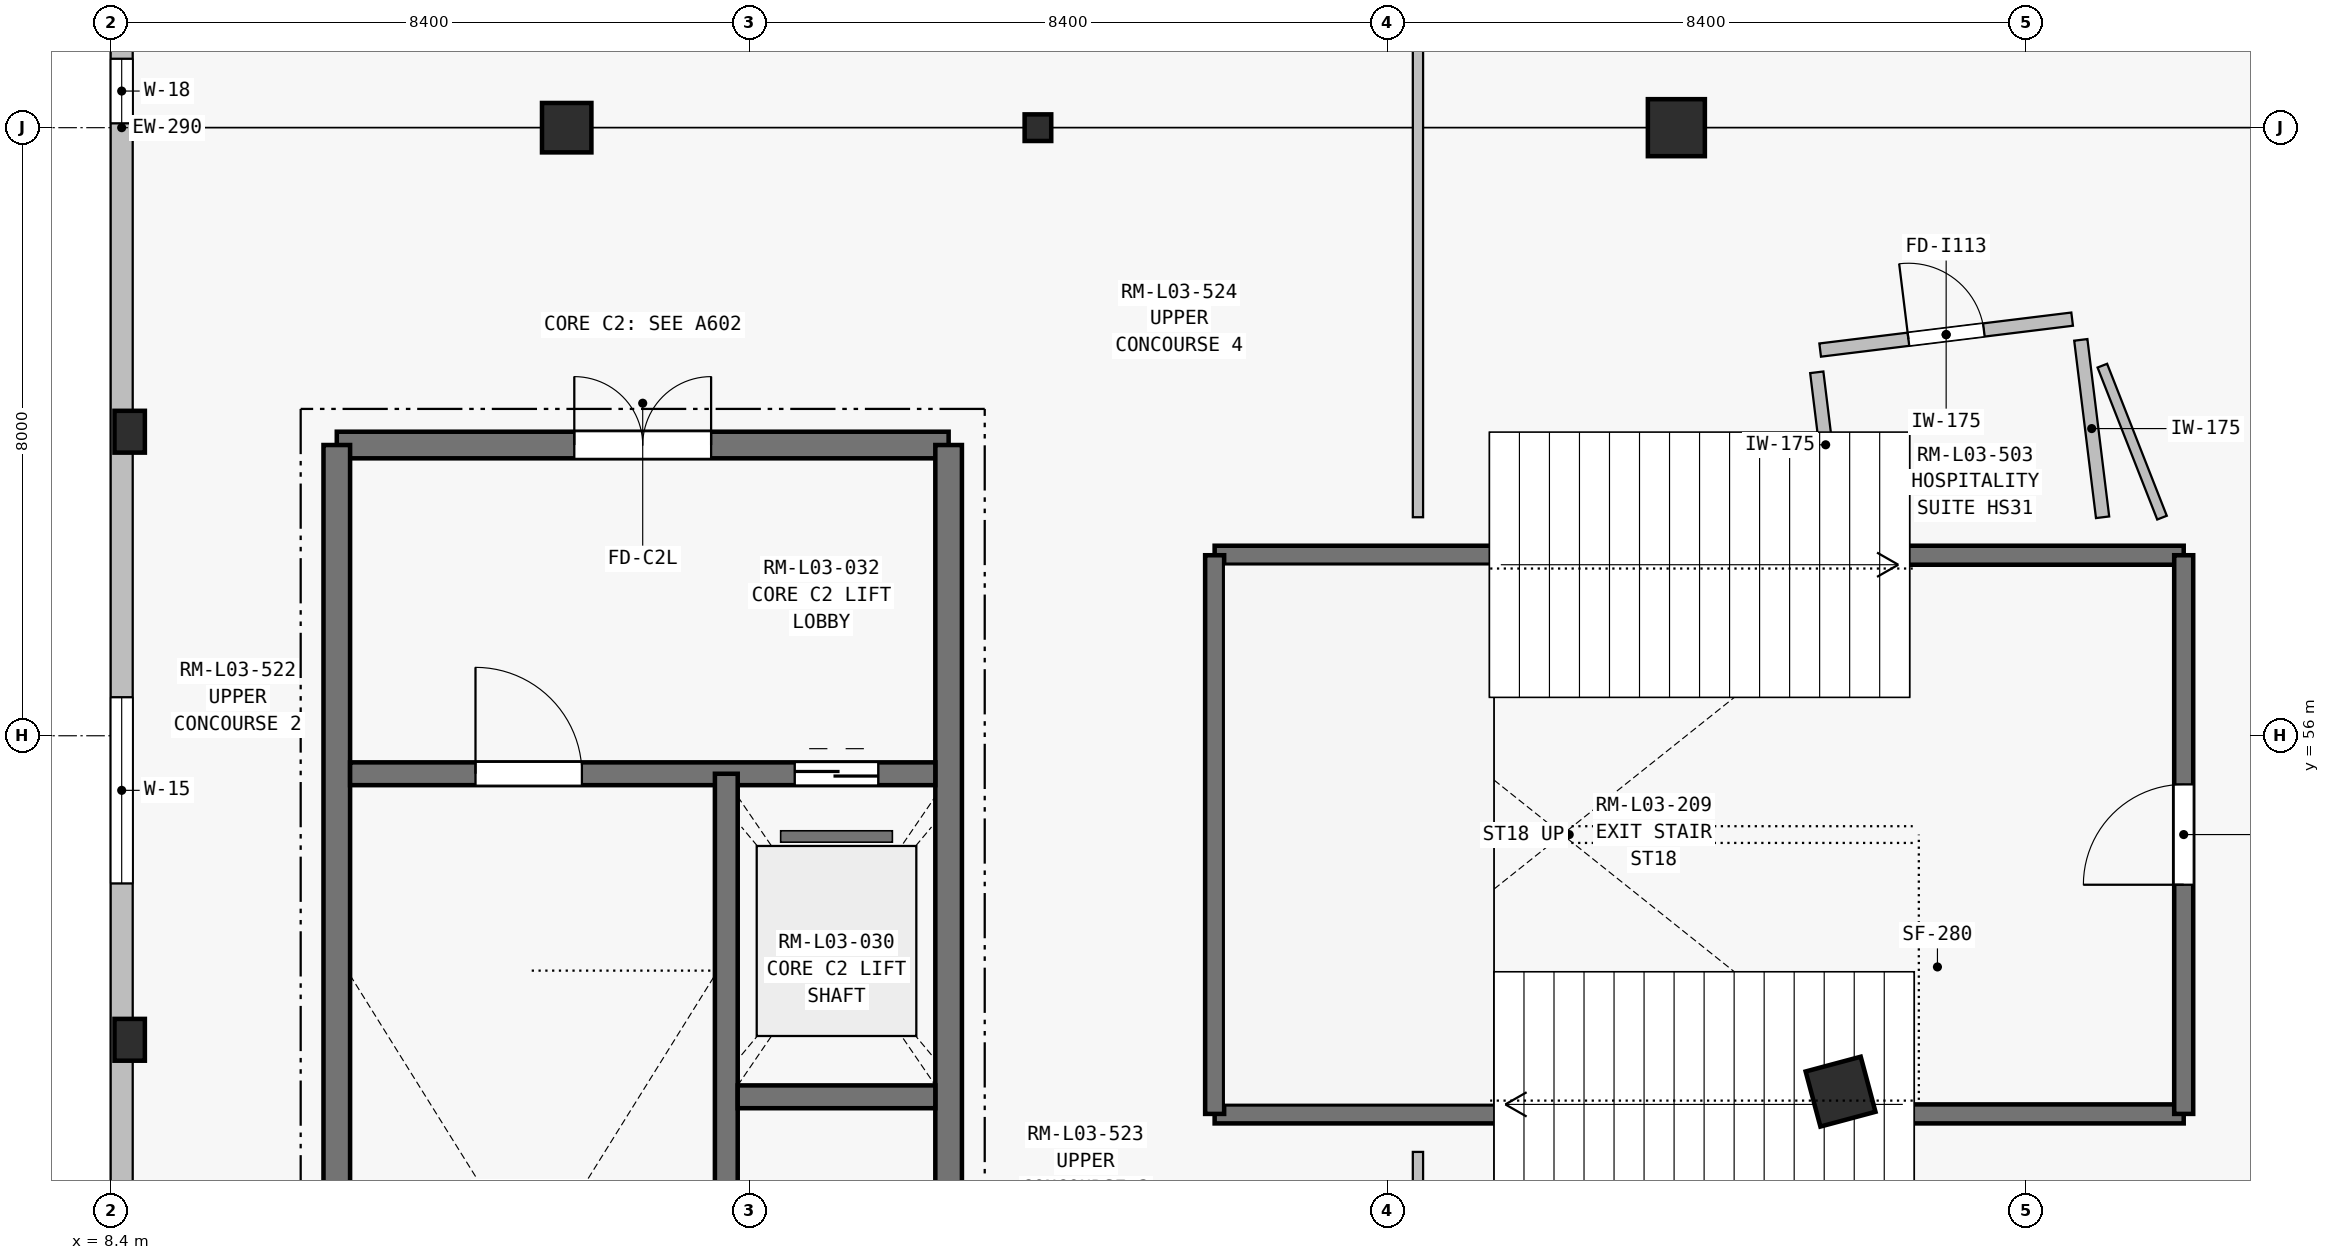
"""IFC4 building model, lengths in metres.
Left out: names, types, materials, properties, quantities, classifications, styles, units other than length and angle.
Written with IfcOpenShell. Run it as: python <this file> out.ifc"""

import sys

from ifc_helpers import new_model, si_unit, direction, frame, frame_2d, origin, origin_2d, place, context, subcontext, project, spatial, rectangle, i_section, extrude, element, fill, save


model = new_model("IFC4")
c1 = context("Model", 3, precision=1e-05, world=origin(), true_north=direction((0.0, 1.0)))
c2 = subcontext(c1, "Body", "Model", "MODEL_VIEW")
j1 = project(units=[si_unit("LENGTHUNIT", "METRE"), si_unit("PLANEANGLEUNIT", "RADIAN")], contexts=[c1])
p1 = place(None, origin())
s1 = spatial("IfcSite", under=j1, at=p1, CompositionType="ELEMENT")
p2 = place(p1, origin())
s2 = spatial("IfcBuilding", under=s1, at=p2, CompositionType="ELEMENT")
p3 = place(p2, frame((0.0, 0.0, 14.4)))
s3 = spatial("IfcBuildingStorey", under=s2, at=p3, CompositionType="ELEMENT", Elevation=14.4)
for number, where, z_axis, x_axis in (
    (1, (29.0, 64.0, 0.0), (0.0, 0.0, 1.0), (-1.0, 0.0, 0.0)),
    (2, (31.16, 51.318, 0.0), (0.0, 0.0, 1.0), (-0.966, -0.259, 0.0)),
):
    element("IfcColumn", number, at=place(p3, frame(where, z_axis=z_axis, x_axis=x_axis)), inside=s3, PredefinedType="COLUMN", context=c2, shape_type="SweptSolid", body=[
        extrude(rectangle(XDim=0.75, YDim=0.75, at=origin_2d()), origin(), (0.0, 0.0, 1.0), 4.5),
    ])
p4 = place(p3, frame((20.6, 64.0, 0.0), z_axis=(0.0, 0.0, 1.0), x_axis=(-1.0, 0.0, 0.0)))
e3 = element("IfcColumn", 3, at=p4, inside=s3, PredefinedType="COLUMN", context=c2, shape_type="SweptSolid", body=[
    extrude(i_section(OverallWidth=0.35, OverallDepth=0.35, WebThickness=0.014, FlangeThickness=0.024, at=origin_2d()), origin(), (0.0, 0.0, 1.0), 4.5),
])
p5 = place(p3, frame((14.4, 64.0, 0.0), z_axis=(0.0, 0.0, 1.0), x_axis=(-1.0, 0.0, 0.0)))
e4 = element("IfcColumn", 4, at=p5, inside=s3, PredefinedType="COLUMN", context=c2, shape_type="SweptSolid", body=[
    extrude(rectangle(XDim=0.65, YDim=0.65, at=origin_2d()), origin(), (0.0, 0.0, 1.0), 4.26),
])
for number, where, z_axis, x_axis in (
    (5, (8.65, 52.0, 0.0), (0.0, 0.0, 1.0), (1.0, 0.0, 0.0)),
    (6, (8.65, 60.0, 0.0), (0.0, 0.0, 1.0), (1.0, 0.0, 0.0)),
):
    element("IfcColumn", number, at=place(p3, frame(where, z_axis=z_axis, x_axis=x_axis)), inside=s3, PredefinedType="PILASTER", context=c2, shape_type="SweptSolid", body=[
        extrude(rectangle(XDim=0.4, YDim=0.55, at=origin_2d()), origin(), (0.0, 0.0, 1.0), 5.45),
    ])
p6 = place(p3, frame((8.545, 42.832, 0.0), z_axis=(0.0, 0.0, 1.0), x_axis=(0.0, 1.0, 0.0)))
e7 = element("IfcWall", 7, at=p6, inside=s3, PredefinedType="SOLIDWALL", context=c2, shape_type="SweptSolid", body=[
    extrude(rectangle(XDim=42.336, YDim=0.29, at=frame_2d((21.168, 0.0))), origin(), (0.0, 0.0, 1.0), 4.26),
])
p7 = place(p6, frame((11.225, 0.0, 0.9)))
e8 = element("IfcOpeningElement", 8, at=p7, cuts=e7, PredefinedType="OPENING", context=c2, shape_type="SweptSolid", body=[
    extrude(rectangle(XDim=2.45, YDim=1.35, at=frame_2d((1.225, 0.675))), frame((0.0, 0.155, 0.0), z_axis=(0.0, -1.0, 0.0), x_axis=(1.0, 0.0, 0.0)), (0.0, 0.0, 1.0), 0.31),
])
p8 = place(p6, frame((21.225, 0.0, 0.9)))
e9 = element("IfcOpeningElement", 9, at=p8, cuts=e7, PredefinedType="OPENING", context=c2, shape_type="SweptSolid", body=[
    extrude(rectangle(XDim=0.85, YDim=2.1, at=frame_2d((0.425, 1.05))), frame((0.0, 0.155, 0.0), z_axis=(0.0, -1.0, 0.0), x_axis=(1.0, 0.0, 0.0)), (0.0, 0.0, 1.0), 0.31),
])
p9 = place(p6, frame((34.625, 0.0, 0.75)))
e10 = element("IfcOpeningElement", 10, at=p9, cuts=e7, PredefinedType="OPENING", context=c2, shape_type="SweptSolid", body=[
    extrude(rectangle(XDim=1.65, YDim=2.4, at=frame_2d((0.825, 1.2))), frame((0.0, 0.155, 0.0), z_axis=(0.0, -1.0, 0.0), x_axis=(1.0, 0.0, 0.0)), (0.0, 0.0, 1.0), 0.31),
])
p10 = place(p3, frame((11.375, 59.825, 0.0), z_axis=(0.0, 0.0, 1.0), x_axis=(1.0, 0.0, 0.0)))
e11 = element("IfcWall", 11, at=p10, inside=s3, PredefinedType="SHEAR", context=c2, shape_type="SweptSolid", body=[
    extrude(rectangle(XDim=8.05, YDim=0.35, at=frame_2d((4.025, 0.0))), origin(), (0.0, 0.0, 1.0), 4.5),
])
p11 = place(p10, frame((3.125, 0.0, 0.0)))
e12 = element("IfcOpeningElement", 12, at=p11, cuts=e11, PredefinedType="OPENING", context=c2, shape_type="SweptSolid", body=[
    extrude(rectangle(XDim=1.8, YDim=2.25, at=frame_2d((0.9, 1.125))), frame((0.0, 0.185, 0.0), z_axis=(0.0, -1.0, 0.0), x_axis=(1.0, 0.0, 0.0)), (0.0, 0.0, 1.0), 0.37),
])
p12 = place(p3, frame((11.375, 44.975, 0.0), z_axis=(0.0, 0.0, 1.0), x_axis=(0.0, 1.0, 0.0)))
e13 = element("IfcWall", 13, at=p12, inside=s3, PredefinedType="SHEAR", context=c2, shape_type="SweptSolid", body=[
    extrude(rectangle(XDim=14.85, YDim=0.35, at=frame_2d((7.425, 0.0))), origin(), (0.0, 0.0, 1.0), 4.5),
])
p13 = place(p3, frame((19.425, 44.975, 0.0), z_axis=(0.0, 0.0, 1.0), x_axis=(0.0, 1.0, 0.0)))
e14 = element("IfcWall", 14, at=p13, inside=s3, PredefinedType="SHEAR", context=c2, shape_type="SweptSolid", body=[
    extrude(rectangle(XDim=14.85, YDim=0.35, at=frame_2d((7.425, 0.0))), origin(), (0.0, 0.0, 1.0), 4.5),
])
p14 = place(p13, frame((2.855, 0.0, 0.0)))
e15 = element("IfcOpeningElement", 15, at=p14, cuts=e14, PredefinedType="OPENING", context=c2, shape_type="SweptSolid", body=[
    extrude(rectangle(XDim=0.9, YDim=2.1, at=frame_2d((0.45, 1.05))), frame((0.0, 0.185, 0.0), z_axis=(0.0, -1.0, 0.0), x_axis=(1.0, 0.0, 0.0)), (0.0, 0.0, 1.0), 0.37),
])
p15 = place(p3, frame((11.55, 55.5, 0.0), z_axis=(0.0, 0.0, 1.0), x_axis=(1.0, 0.0, 0.0)))
e16 = element("IfcWall", 16, at=p15, inside=s3, PredefinedType="SHEAR", context=c2, shape_type="SweptSolid", body=[
    extrude(rectangle(XDim=7.7, YDim=0.3, at=frame_2d((3.85, 0.0))), origin(), (0.0, 0.0, 1.0), 4.5),
])
p16 = place(p15, frame((1.65, 0.0, 0.0)))
e17 = element("IfcOpeningElement", 17, at=p16, cuts=e16, PredefinedType="OPENING", context=c2, shape_type="SweptSolid", body=[
    extrude(rectangle(XDim=1.4, YDim=2.2, at=frame_2d((0.7, 1.1))), frame((0.0, 0.16, 0.0), z_axis=(0.0, -1.0, 0.0), x_axis=(1.0, 0.0, 0.0)), (0.0, 0.0, 1.0), 0.32),
])
p17 = place(p15, frame((5.85, 0.0, 0.0)))
e18 = element("IfcOpeningElement", 18, at=p17, cuts=e16, PredefinedType="OPENING", context=c2, shape_type="SweptSolid", body=[
    extrude(rectangle(XDim=1.1, YDim=2.2, at=frame_2d((0.55, 1.1))), frame((0.0, 0.16, 0.0), z_axis=(0.0, -1.0, 0.0), x_axis=(1.0, 0.0, 0.0)), (0.0, 0.0, 1.0), 0.32),
])
p18 = place(p3, frame((16.5, 45.15, 0.0), z_axis=(0.0, 0.0, 1.0), x_axis=(0.0, 1.0, 0.0)))
e19 = element("IfcWall", 19, at=p18, inside=s3, PredefinedType="SHEAR", context=c2, shape_type="SweptSolid", body=[
    extrude(rectangle(XDim=10.35, YDim=0.3, at=frame_2d((5.175, 0.0))), origin(), (0.0, 0.0, 1.0), 4.5),
])
p19 = place(p3, frame((16.65, 51.25, 0.0), z_axis=(0.0, 0.0, 1.0), x_axis=(1.0, 0.0, 0.0)))
e20 = element("IfcWall", 20, at=p19, inside=s3, PredefinedType="SHEAR", context=c2, shape_type="SweptSolid", body=[
    extrude(rectangle(XDim=2.6, YDim=0.3, at=frame_2d((1.3, 0.0))), origin(), (0.0, 0.0, 1.0), 4.5),
])
for number, where, z_axis, x_axis in (
    (21, (22.925, 51.025, 0.0), (0.0, 0.0, 1.0), (1.0, 0.0, 0.0)),
    (22, (22.925, 58.375, 0.0), (0.0, 0.0, 1.0), (1.0, 0.0, 0.0)),
):
    element("IfcWall", number, at=place(p3, frame(where, z_axis=z_axis, x_axis=x_axis)), inside=s3, PredefinedType="SHEAR", context=c2, shape_type="SweptSolid", body=[
        extrude(rectangle(XDim=12.75, YDim=0.25, at=frame_2d((6.375, 0.0))), origin(), (0.0, 0.0, 1.0), 4.5),
    ])
p20 = place(p3, frame((22.925, 51.025, 0.0), z_axis=(0.0, 0.0, 1.0), x_axis=(0.0, 1.0, 0.0)))
e23 = element("IfcWall", 23, at=p20, inside=s3, PredefinedType="SHEAR", context=c2, shape_type="SweptSolid", body=[
    extrude(rectangle(XDim=7.35, YDim=0.25, at=frame_2d((3.675, 0.0))), origin(), (0.0, 0.0, 1.0), 4.5),
])
p21 = place(p3, frame((35.675, 51.025, 0.0), z_axis=(0.0, 0.0, 1.0), x_axis=(0.0, 1.0, 0.0)))
e24 = element("IfcWall", 24, at=p21, inside=s3, PredefinedType="SHEAR", context=c2, shape_type="SweptSolid", body=[
    extrude(rectangle(XDim=7.35, YDim=0.25, at=frame_2d((3.675, 0.0))), origin(), (0.0, 0.0, 1.0), 4.5),
])
p22 = place(p21, frame((3.015, 0.0, 0.0)))
e25 = element("IfcOpeningElement", 25, at=p22, cuts=e24, PredefinedType="OPENING", context=c2, shape_type="SweptSolid", body=[
    extrude(rectangle(XDim=1.32, YDim=2.2, at=frame_2d((0.66, 1.1))), frame((0.0, 0.135, 0.0), z_axis=(0.0, -1.0, 0.0), x_axis=(1.0, 0.0, 0.0)), (0.0, 0.0, 1.0), 0.27),
])
p23 = place(p3, frame((30.892, 61.074, 0.0), z_axis=(0.0, 0.0, 1.0), x_axis=(0.992547643848, 0.12185718974, 0.0)))
e26 = element("IfcWall", 26, at=p23, inside=s3, PredefinedType="PARTITIONING", context=c2, shape_type="SweptSolid", body=[
    extrude(rectangle(XDim=3.34, YDim=0.175, at=frame_2d((1.67, 0.0))), origin(), (0.0, 0.0, 1.0), 4.2),
])
p24 = place(p23, frame((1.17, 0.0, 0.0)))
e27 = element("IfcOpeningElement", 27, at=p24, cuts=e26, PredefinedType="OPENING", context=c2, shape_type="SweptSolid", body=[
    extrude(rectangle(XDim=1.0, YDim=2.2, at=frame_2d((0.5, 1.1))), frame((0.0, 0.097, 0.0), z_axis=(0.0, -1.0, 0.0), x_axis=(1.0, 0.0, 0.0)), (0.0, 0.0, 1.0), 0.195),
])
p25 = place(p3, frame((34.321, 61.208, 0.0), z_axis=(0.0, 0.0, 1.0), x_axis=(0.121900274378, -0.992542353306, 0.0)))
e28 = element("IfcWall", 28, at=p25, inside=s3, PredefinedType="PARTITIONING", context=c2, shape_type="SweptSolid", body=[
    extrude(rectangle(XDim=2.351, YDim=0.175, at=frame_2d((1.176, 0.0))), origin(), (0.0, 0.0, 1.0), 4.2),
])
p26 = place(p3, frame((31.081, 58.875, 0.0), z_axis=(0.0, 0.0, 1.0), x_axis=(-0.1217200163, 0.992564475302, 0.0)))
e29 = element("IfcWall", 29, at=p26, inside=s3, PredefinedType="PARTITIONING", context=c2, shape_type="SweptSolid", body=[
    extrude(rectangle(XDim=1.922, YDim=0.175, at=frame_2d((0.961, 0.0))), origin(), (0.0, 0.0, 1.0), 4.2),
])
p27 = place(p3, frame((25.6, 48.48, 0.0), z_axis=(0.0, 0.0, 1.0), x_axis=(0.0, 1.0, 0.0)))
e30 = element("IfcWall", 30, at=p27, inside=s3, PredefinedType="PARTITIONING", context=c2, shape_type="SweptSolid", body=[
    extrude(rectangle(XDim=2.045, YDim=0.135, at=frame_2d((1.022, 0.0))), origin(), (0.0, 0.0, 1.0), 4.2),
])
p28 = place(p3, frame((35.389, 58.869, 0.0), z_axis=(0.0, 0.0, 1.0), x_axis=(-0.365367553019, 0.930863336479, 0.0)))
e31 = element("IfcWall", 31, at=p28, inside=s3, PredefinedType="PARTITIONING", context=c2, shape_type="SweptSolid", body=[
    extrude(rectangle(XDim=2.148, YDim=0.135, at=frame_2d((1.074, 0.0))), origin(), (0.0, 0.0, 1.0), 4.2),
])
p29 = place(p3, frame((25.6, 58.875, 0.0), z_axis=(0.0, 0.0, 1.0), x_axis=(0.0, 1.0, 0.0)))
e32 = element("IfcWall", 32, at=p29, inside=s3, PredefinedType="PARTITIONING", context=c2, shape_type="SweptSolid", body=[
    extrude(rectangle(XDim=9.045, YDim=0.135, at=frame_2d((4.522, 0.0))), origin(), (0.0, 0.0, 1.0), 3.705),
])
p30 = place(p7, origin())
e33 = element("IfcWindow", 33, at=p30, inside=s3, PartitioningType="SINGLE_PANEL", PredefinedType="WINDOW", context=c2, shape_type="SweptSolid", body=[
    extrude(rectangle(XDim=2.45, YDim=1.35, at=frame_2d((1.225, 0.675))), frame((0.0, 0.03, 0.0), z_axis=(0.0, -1.0, 0.0), x_axis=(1.0, 0.0, 0.0)), (0.0, 0.0, 1.0), 0.06),
])
fill(e8, e33)
p31 = place(p8, origin())
e34 = element("IfcWindow", 34, at=p31, inside=s3, PartitioningType="SINGLE_PANEL", PredefinedType="WINDOW", context=c2, shape_type="SweptSolid", body=[
    extrude(rectangle(XDim=0.85, YDim=2.1, at=frame_2d((0.425, 1.05))), frame((0.0, 0.03, 0.0), z_axis=(0.0, -1.0, 0.0), x_axis=(1.0, 0.0, 0.0)), (0.0, 0.0, 1.0), 0.06),
])
fill(e9, e34)
p32 = place(p11, origin())
e35 = element("IfcDoor", 35, at=p32, inside=s3, OperationType="DOUBLE_DOOR_SINGLE_SWING", PredefinedType="DOOR", context=c2, shape_type="SweptSolid", body=[
    extrude(rectangle(XDim=1.8, YDim=2.25, at=frame_2d((0.9, 1.125))), frame((0.0, 0.025, 0.0), z_axis=(0.0, -1.0, 0.0), x_axis=(1.0, 0.0, 0.0)), (0.0, 0.0, 1.0), 0.05),
])
fill(e12, e35)
p33 = place(p16, origin())
e36 = element("IfcDoor", 36, at=p33, inside=s3, OperationType="SINGLE_SWING_LEFT", PredefinedType="DOOR", context=c2, shape_type="SweptSolid", body=[
    extrude(rectangle(XDim=1.4, YDim=2.2, at=frame_2d((0.7, 1.1))), frame((0.0, 0.025, 0.0), z_axis=(0.0, -1.0, 0.0), x_axis=(1.0, 0.0, 0.0)), (0.0, 0.0, 1.0), 0.05),
])
fill(e17, e36)
p34 = place(p17, origin())
e37 = element("IfcDoor", 37, at=p34, inside=s3, OperationType="SLIDING_TO_LEFT", PredefinedType="DOOR", context=c2, shape_type="SweptSolid", body=[
    extrude(rectangle(XDim=1.1, YDim=2.2, at=frame_2d((0.55, 1.1))), frame((0.0, 0.025, 0.0), z_axis=(0.0, -1.0, 0.0), x_axis=(1.0, 0.0, 0.0)), (0.0, 0.0, 1.0), 0.05),
])
fill(e18, e37)
p35 = place(p22, origin())
e38 = element("IfcDoor", 38, at=p35, inside=s3, OperationType="SINGLE_SWING_LEFT", PredefinedType="DOOR", context=c2, shape_type="SweptSolid", body=[
    extrude(rectangle(XDim=1.32, YDim=2.2, at=frame_2d((0.66, 1.1))), frame((0.0, 0.025, 0.0), z_axis=(0.0, -1.0, 0.0), x_axis=(1.0, 0.0, 0.0)), (0.0, 0.0, 1.0), 0.05),
])
fill(e25, e38)
p36 = place(p24, origin())
e39 = element("IfcDoor", 39, at=p36, inside=s3, OperationType="SINGLE_SWING_LEFT", PredefinedType="DOOR", context=c2, shape_type="SweptSolid", body=[
    extrude(rectangle(XDim=1.0, YDim=2.2, at=frame_2d((0.5, 1.1))), frame((0.0, 0.025, 0.0), z_axis=(0.0, -1.0, 0.0), x_axis=(1.0, 0.0, 0.0)), (0.0, 0.0, 1.0), 0.05),
])
fill(e27, e39)
save(model, sys.argv[1])
